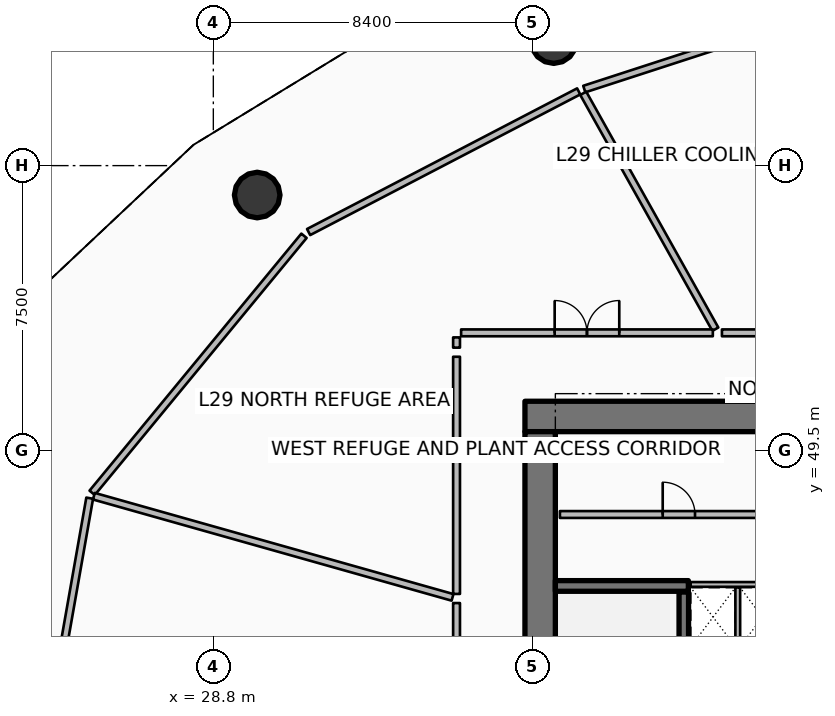
"""IFC4 building model, lengths in metres.
Left out: names, types, materials, properties, quantities, classifications, styles, units other than length and angle.
Written with IfcOpenShell. Run it as: python <this file> out.ifc"""

import sys

from ifc_helpers import new_model, si_unit, direction, frame, frame_2d, origin, origin_2d, place, context, subcontext, project, spatial, rectangle, circle, extrude, element, fill, save


model = new_model("IFC4")
c1 = context("Model", 3, precision=1e-05, world=origin(), true_north=direction((0.0, 1.0)))
c2 = subcontext(c1, "Body", "Model", "MODEL_VIEW")
j1 = project(units=[si_unit("LENGTHUNIT", "METRE"), si_unit("PLANEANGLEUNIT", "RADIAN")], contexts=[c1])
p1 = place(None, origin())
s1 = spatial("IfcSite", under=j1, at=p1, CompositionType="ELEMENT")
p2 = place(p1, origin())
s2 = spatial("IfcBuilding", under=s1, at=p2, CompositionType="ELEMENT")
p3 = place(p2, frame((0.0, 0.0, 116.4)))
s3 = spatial("IfcBuildingStorey", under=s2, at=p3, CompositionType="ELEMENT", Elevation=116.4)
p4 = place(p3, frame((37.0, 50.4, 0.0), z_axis=(0.0, 0.0, 1.0), x_axis=(1.0, 0.0, 0.0)))
e1 = element("IfcWall", 1, at=p4, inside=s3, PredefinedType="SHEAR", context=c2, shape_type="SweptSolid", body=[
    extrude(rectangle(XDim=9.9, YDim=0.8, at=frame_2d((4.95, 0.0))), origin(), (0.0, 0.0, 1.0), 6.6),
])
p5 = place(p3, frame((37.4, 34.0, 0.0), z_axis=(0.0, 0.0, 1.0), x_axis=(0.0, 1.0, 0.0)))
e2 = element("IfcWall", 2, at=p5, inside=s3, PredefinedType="SHEAR", context=c2, shape_type="SweptSolid", body=[
    extrude(rectangle(XDim=16.0, YDim=0.8, at=frame_2d((8.0, 0.0))), origin(), (0.0, 0.0, 1.0), 6.6),
])
p6 = place(p3, frame((37.8, 45.94, 0.0), z_axis=(0.0, 0.0, 1.0), x_axis=(1.0, 0.0, 0.0)))
e3 = element("IfcWall", 3, at=p6, inside=s3, PredefinedType="SHEAR", context=c2, shape_type="SweptSolid", body=[
    extrude(rectangle(XDim=3.5, YDim=0.28, at=frame_2d((1.75, 0.0))), origin(), (0.0, 0.0, 1.0), 6.6),
])
for number, where, z_axis, x_axis in (
    (4, (37.758, 60.289, 0.0), (0.0, 0.0, 1.0), (1.0, 0.0, 0.0)),
    (5, (29.955, 56.226, 0.0), (0.0, 0.0, 1.0), (1.0, 0.0, 0.0)),
):
    element("IfcColumn", number, at=place(p3, frame(where, z_axis=z_axis, x_axis=x_axis)), inside=s3, PredefinedType="COLUMN", context=c2, shape_type="SweptSolid", body=[
        extrude(circle(Radius=0.6, at=origin_2d()), origin(), (0.0, 0.0, 1.0), 6.28),
    ])
p7 = place(p3, frame((41.18, 38.22, 0.0), z_axis=(0.0, 0.0, 1.0), x_axis=(0.0, 1.0, 0.0)))
e6 = element("IfcWall", 6, at=p7, inside=s3, PredefinedType="SOLIDWALL", context=c2, shape_type="SweptSolid", body=[
    extrude(rectangle(XDim=7.56, YDim=0.25, at=frame_2d((3.78, 0.0))), origin(), (0.0, 0.0, 1.0), 6.28),
])
p8 = place(p7, frame((0.3, 0.0, 0.0)))
e7 = element("IfcOpeningElement", 7, at=p8, cuts=e6, PredefinedType="OPENING", context=c2, shape_type="SweptSolid", body=[
    extrude(rectangle(XDim=1.55, YDim=2.15, at=frame_2d((0.775, 1.075))), frame((0.0, 0.135, 0.0), z_axis=(0.0, -1.0, 0.0), x_axis=(1.0, 0.0, 0.0)), (0.0, 0.0, 1.0), 0.27),
])
p9 = place(p3, frame((37.92, 47.82, 0.0), z_axis=(0.0, 0.0, 1.0), x_axis=(1.0, 0.0, 0.0)))
e8 = element("IfcWall", 8, at=p9, inside=s3, PredefinedType="PARTITIONING", context=c2, shape_type="SweptSolid", body=[
    extrude(rectangle(XDim=6.26, YDim=0.18, at=frame_2d((3.13, 0.0))), origin(), (0.0, 0.0, 1.0), 6.28),
])
p10 = place(p9, frame((2.705, 0.0, 0.0)))
e9 = element("IfcOpeningElement", 9, at=p10, cuts=e8, PredefinedType="OPENING", context=c2, shape_type="SweptSolid", body=[
    extrude(rectangle(XDim=0.85, YDim=2.06, at=frame_2d((0.425, 1.03))), frame((0.0, 0.1, 0.0), z_axis=(0.0, -1.0, 0.0), x_axis=(1.0, 0.0, 0.0)), (0.0, 0.0, 1.0), 0.2),
])
p11 = place(p3, frame((41.36, 45.98, 0.0), z_axis=(0.0, 0.0, 1.0), x_axis=(1.0, 0.0, 0.0)))
e10 = element("IfcWall", 10, at=p11, inside=s3, PredefinedType="PARTITIONING", context=c2, shape_type="SweptSolid", body=[
    extrude(rectangle(XDim=5.36, YDim=0.125, at=frame_2d((2.68, 0.0))), origin(), (0.0, 0.0, 1.0), 5.72),
])
p12 = place(p3, frame((42.6, 44.35, 0.0), z_axis=(0.0, 0.0, 1.0), x_axis=(0.0, 1.0, 0.0)))
e11 = element("IfcWall", 11, at=p12, inside=s3, PredefinedType="PARTITIONING", context=c2, shape_type="SweptSolid", body=[
    extrude(rectangle(XDim=1.55, YDim=0.125, at=frame_2d((0.775, 0.0))), origin(), (0.0, 0.0, 1.0), 5.72),
])
p13 = place(p3, frame((45.635, 61.313, 0.0), z_axis=(0.0, 0.0, 1.0), x_axis=(-0.951058670218, -0.309010365204, 0.0)))
e12 = element("IfcWall", 12, at=p13, inside=s3, PredefinedType="PARTITIONING", context=c2, shape_type="SweptSolid", body=[
    extrude(rectangle(XDim=7.438, YDim=0.18, at=frame_2d((3.719, 0.0))), origin(), (0.0, 0.0, 1.0), 5.273),
])
p14 = place(p3, frame((38.414, 58.953, 0.0), z_axis=(0.0, 0.0, 1.0), x_axis=(-0.886950751462, -0.46186401081, 0.0)))
e13 = element("IfcWall", 13, at=p14, inside=s3, PredefinedType="PARTITIONING", context=c2, shape_type="SweptSolid", body=[
    extrude(rectangle(XDim=8.012, YDim=0.18, at=frame_2d((4.006, 0.0))), origin(), (0.0, 0.0, 1.0), 2.304),
])
p15 = place(p3, frame((31.186, 55.154, 0.0), z_axis=(0.0, 0.0, 1.0), x_axis=(-0.636015746841, -0.771676078267, 0.0)))
e14 = element("IfcWall", 14, at=p15, inside=s3, PredefinedType="PARTITIONING", context=c2, shape_type="SweptSolid", body=[
    extrude(rectangle(XDim=8.764, YDim=0.18, at=frame_2d((4.382, 0.0))), origin(), (0.0, 0.0, 1.0), 2.304),
])
p16 = place(p3, frame((25.547, 48.25, 0.0), z_axis=(0.0, 0.0, 1.0), x_axis=(-0.173665182346, -0.984804754477, 0.0)))
e15 = element("IfcWall", 15, at=p16, inside=s3, PredefinedType="PARTITIONING", context=c2, shape_type="SweptSolid", body=[
    extrude(rectangle(XDim=9.157, YDim=0.18, at=frame_2d((4.579, 0.0))), origin(), (0.0, 0.0, 1.0), 2.304),
])
p17 = place(p3, frame((46.625, 52.6, 0.0), z_axis=(0.0, 0.0, 1.0), x_axis=(-1.0, 0.0, 0.0)))
e16 = element("IfcWall", 16, at=p17, inside=s3, PredefinedType="PARTITIONING", context=c2, shape_type="SweptSolid", body=[
    extrude(rectangle(XDim=4.442, YDim=0.18, at=frame_2d((2.221, 0.0))), origin(), (0.0, 0.0, 1.0), 5.273),
])
p18 = place(p17, frame((1.696, 0.0, 0.0)))
e17 = element("IfcOpeningElement", 17, at=p18, cuts=e16, PredefinedType="OPENING", context=c2, shape_type="SweptSolid", body=[
    extrude(rectangle(XDim=1.05, YDim=2.1, at=frame_2d((0.525, 1.05))), frame((0.0, 0.1, 0.0), z_axis=(0.0, -1.0, 0.0), x_axis=(1.0, 0.0, 0.0)), (0.0, 0.0, 1.0), 0.2),
])
p19 = place(p3, frame((42.01, 52.696, 0.0), z_axis=(0.0, 0.0, 1.0), x_axis=(-0.488621135235, 0.872496066583, 0.0)))
e18 = element("IfcWall", 18, at=p19, inside=s3, PredefinedType="PARTITIONING", context=c2, shape_type="SweptSolid", body=[
    extrude(rectangle(XDim=7.114, YDim=0.18, at=frame_2d((3.557, 0.0))), origin(), (0.0, 0.0, 1.0), 5.273),
])
p20 = place(p3, frame((41.944, 52.6, 0.0), z_axis=(0.0, 0.0, 1.0), x_axis=(-1.0, 0.0, 0.0)))
e19 = element("IfcWall", 19, at=p20, inside=s3, PredefinedType="PARTITIONING", context=c2, shape_type="SweptSolid", body=[
    extrude(rectangle(XDim=6.624, YDim=0.18, at=frame_2d((3.312, 0.0))), origin(), (0.0, 0.0, 1.0), 5.273),
])
p21 = place(p20, frame((2.462, 0.0, 0.0)))
e20 = element("IfcOpeningElement", 20, at=p21, cuts=e19, PredefinedType="OPENING", context=c2, shape_type="SweptSolid", body=[
    extrude(rectangle(XDim=1.7, YDim=2.15, at=frame_2d((0.85, 1.075))), frame((0.0, 0.1, 0.0), z_axis=(0.0, -1.0, 0.0), x_axis=(1.0, 0.0, 0.0)), (0.0, 0.0, 1.0), 0.2),
])
p22 = place(p3, frame((35.2, 52.48, 0.0), z_axis=(0.0, 0.0, 1.0), x_axis=(0.0, -1.0, 0.0)))
e21 = element("IfcWall", 21, at=p22, inside=s3, PredefinedType="PARTITIONING", context=c2, shape_type="SweptSolid", body=[
    extrude(rectangle(XDim=0.269, YDim=0.18, at=frame_2d((0.135, 0.0))), origin(), (0.0, 0.0, 1.0), 2.304),
])
p23 = place(p3, frame((35.2, 51.971, 0.0), z_axis=(0.0, 0.0, 1.0), x_axis=(0.0, -1.0, 0.0)))
e22 = element("IfcWall", 22, at=p23, inside=s3, PredefinedType="PARTITIONING", context=c2, shape_type="SweptSolid", body=[
    extrude(rectangle(XDim=6.241, YDim=0.18, at=frame_2d((3.12, 0.0))), origin(), (0.0, 0.0, 1.0), 2.304),
])
p24 = place(p3, frame((35.094, 45.64, 0.0), z_axis=(0.0, 0.0, 1.0), x_axis=(-0.962454179432, 0.271444197754, 0.0)))
e23 = element("IfcWall", 23, at=p24, inside=s3, PredefinedType="PARTITIONING", context=c2, shape_type="SweptSolid", body=[
    extrude(rectangle(XDim=9.805, YDim=0.18, at=frame_2d((4.903, 0.0))), origin(), (0.0, 0.0, 1.0), 2.304),
])
p25 = place(p3, frame((35.2, 45.49, 0.0), z_axis=(0.0, 0.0, 1.0), x_axis=(0.0, -1.0, 0.0)))
e24 = element("IfcWall", 24, at=p25, inside=s3, PredefinedType="PARTITIONING", context=c2, shape_type="SweptSolid", body=[
    extrude(rectangle(XDim=4.885, YDim=0.18, at=frame_2d((2.442, 0.0))), origin(), (0.0, 0.0, 1.0), 2.304),
])
p26 = place(p25, frame((1.917, 0.0, 0.0)))
e25 = element("IfcOpeningElement", 25, at=p26, cuts=e24, PredefinedType="OPENING", context=c2, shape_type="SweptSolid", body=[
    extrude(rectangle(XDim=1.05, YDim=2.1, at=frame_2d((0.525, 1.05))), frame((0.0, 0.1, 0.0), z_axis=(0.0, -1.0, 0.0), x_axis=(1.0, 0.0, 0.0)), (0.0, 0.0, 1.0), 0.2),
])
p27 = place(p10, origin())
e26 = element("IfcDoor", 26, at=p27, inside=s3, OperationType="SINGLE_SWING_LEFT", PredefinedType="DOOR", context=c2, shape_type="SweptSolid", body=[
    extrude(rectangle(XDim=0.85, YDim=2.06, at=frame_2d((0.425, 1.03))), frame((0.0, 0.025, 0.0), z_axis=(0.0, -1.0, 0.0), x_axis=(1.0, 0.0, 0.0)), (0.0, 0.0, 1.0), 0.05),
])
fill(e9, e26)
p28 = place(p21, origin())
e27 = element("IfcDoor", 27, at=p28, inside=s3, OperationType="DOUBLE_DOOR_SINGLE_SWING", PredefinedType="DOOR", context=c2, shape_type="SweptSolid", body=[
    extrude(rectangle(XDim=1.7, YDim=2.15, at=frame_2d((0.85, 1.075))), frame((0.0, 0.025, 0.0), z_axis=(0.0, -1.0, 0.0), x_axis=(1.0, 0.0, 0.0)), (0.0, 0.0, 1.0), 0.05),
])
fill(e20, e27)
save(model, sys.argv[1])
